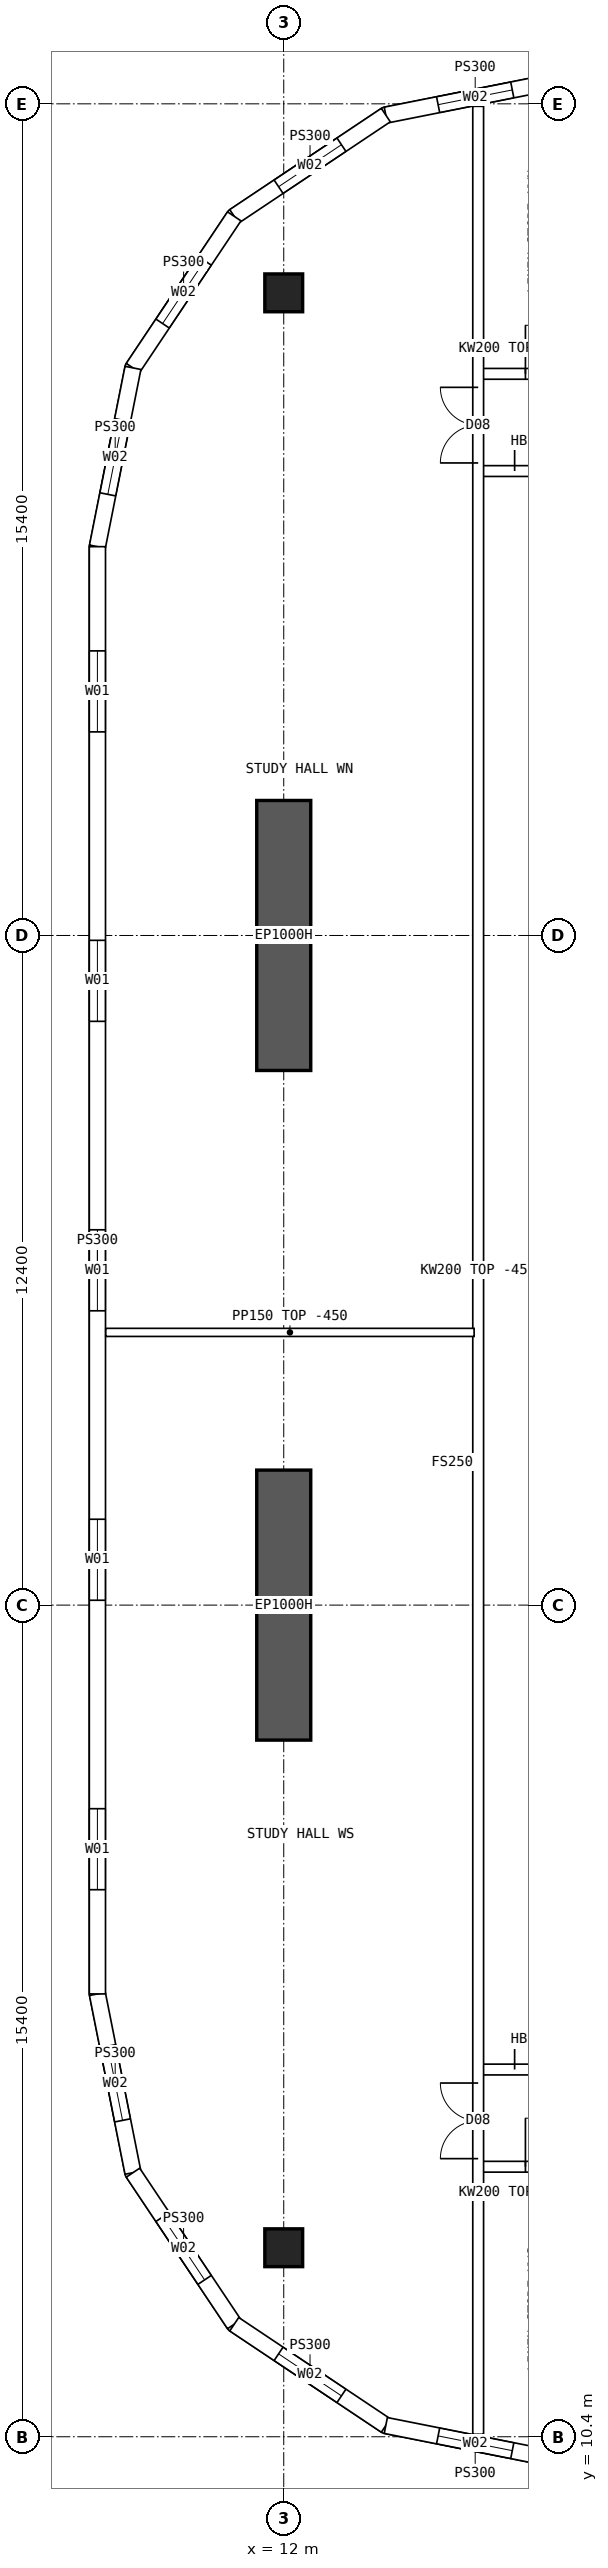
"""IFC4 building model, lengths in metres.
Left out: names, types, materials, properties, quantities, classifications, styles, units other than length and angle.
Written with IfcOpenShell. Run it as: python <this file> out.ifc"""

import sys

from ifc_helpers import new_model, si_unit, direction, frame, frame_2d, origin, origin_2d, place, context, subcontext, project, spatial, polyline, rectangle, hollow_rectangle, outline, extrude, element, fill, save


model = new_model("IFC4")
c1 = context("Model", 3, precision=1e-05, world=origin(), true_north=direction((0.0, 1.0)))
c2 = subcontext(c1, "Body", "Model", "MODEL_VIEW")
j1 = project(units=[si_unit("LENGTHUNIT", "METRE"), si_unit("PLANEANGLEUNIT", "RADIAN")], contexts=[c1])
p1 = place(None, origin())
s1 = spatial("IfcSite", under=j1, at=p1, CompositionType="ELEMENT")
p2 = place(p1, origin())
s2 = spatial("IfcBuilding", under=s1, at=p2, CompositionType="ELEMENT")
p3 = place(p2, frame((0.0, 0.0, 189.85)))
s3 = spatial("IfcBuildingStorey", under=s2, at=p3, CompositionType="ELEMENT", Elevation=189.85)
for number, where, z_axis, x_axis in (
    (1, (12.0, 13.9, 0.0), (0.0, 0.0, 1.0), (1.0, 0.0, 0.0)),
    (2, (12.0, 50.1, 0.0), (0.0, 0.0, 1.0), (1.0, 0.0, 0.0)),
):
    element("IfcColumn", number, at=place(p3, frame(where, z_axis=z_axis, x_axis=x_axis)), inside=s3, PredefinedType="COLUMN", context=c2, shape_type="SweptSolid", body=[
        extrude(hollow_rectangle(XDim=0.7, YDim=0.7, WallThickness=0.07, at=origin_2d()), origin(), (0.0, 0.0, 1.0), 3.75),
    ])
for number, where, z_axis, x_axis in (
    (3, (12.0, 23.3, 0.0), (0.0, 0.0, 1.0), (0.0, 1.0, 0.0)),
    (4, (12.0, 35.7, 0.0), (0.0, 0.0, 1.0), (0.0, 1.0, 0.0)),
):
    element("IfcWall", number, at=place(p3, frame(where, z_axis=z_axis, x_axis=x_axis)), inside=s3, PredefinedType="SHEAR", context=c2, shape_type="SweptSolid", body=[
        extrude(rectangle(XDim=5.0, YDim=1.0, at=frame_2d((2.5, 0.0))), origin(), (0.0, 0.0, 1.0), 3.75),
    ])
p4 = place(p3, frame((8.55, 45.4, 0.0), z_axis=(0.0, 0.0, 1.0), x_axis=(0.0, -1.0, 0.0)))
e5 = element("IfcWall", 5, at=p4, inside=s3, PredefinedType="SOLIDWALL", context=c2, shape_type="SweptSolid", body=[
    extrude(outline(polyline([(-0.015, -0.15), (26.815, -0.15), (26.785, 0.15), (0.015, 0.15), (-0.015, -0.15)])), origin(), (0.0, 0.0, 1.0), 3.3),
])
p5 = place(p4, frame((1.93, 0.0, 0.9)))
e6 = element("IfcOpeningElement", 6, at=p5, cuts=e5, PredefinedType="OPENING", context=c2, shape_type="SweptSolid", body=[
    extrude(rectangle(XDim=1.5, YDim=2.0, at=frame_2d((0.75, 1.0))), frame((0.0, 0.16, 0.0), z_axis=(0.0, -1.0, 0.0), x_axis=(1.0, 0.0, 0.0)), (0.0, 0.0, 1.0), 0.32),
])
p6 = place(p4, frame((7.29, 0.0, 0.9)))
e7 = element("IfcOpeningElement", 7, at=p6, cuts=e5, PredefinedType="OPENING", context=c2, shape_type="SweptSolid", body=[
    extrude(rectangle(XDim=1.5, YDim=2.0, at=frame_2d((0.75, 1.0))), frame((0.0, 0.16, 0.0), z_axis=(0.0, -1.0, 0.0), x_axis=(1.0, 0.0, 0.0)), (0.0, 0.0, 1.0), 0.32),
])
p7 = place(p4, frame((12.65, 0.0, 0.9)))
e8 = element("IfcOpeningElement", 8, at=p7, cuts=e5, PredefinedType="OPENING", context=c2, shape_type="SweptSolid", body=[
    extrude(rectangle(XDim=1.5, YDim=2.0, at=frame_2d((0.75, 1.0))), frame((0.0, 0.16, 0.0), z_axis=(0.0, -1.0, 0.0), x_axis=(1.0, 0.0, 0.0)), (0.0, 0.0, 1.0), 0.32),
])
p8 = place(p4, frame((18.01, 0.0, 0.9)))
e9 = element("IfcOpeningElement", 9, at=p8, cuts=e5, PredefinedType="OPENING", context=c2, shape_type="SweptSolid", body=[
    extrude(rectangle(XDim=1.5, YDim=2.0, at=frame_2d((0.75, 1.0))), frame((0.0, 0.16, 0.0), z_axis=(0.0, -1.0, 0.0), x_axis=(1.0, 0.0, 0.0)), (0.0, 0.0, 1.0), 0.32),
])
p9 = place(p4, frame((23.37, 0.0, 0.9)))
e10 = element("IfcOpeningElement", 10, at=p9, cuts=e5, PredefinedType="OPENING", context=c2, shape_type="SweptSolid", body=[
    extrude(rectangle(XDim=1.5, YDim=2.0, at=frame_2d((0.75, 1.0))), frame((0.0, 0.16, 0.0), z_axis=(0.0, -1.0, 0.0), x_axis=(1.0, 0.0, 0.0)), (0.0, 0.0, 1.0), 0.32),
])
p10 = place(p3, frame((17.2, 54.05, 0.0), z_axis=(0.0, 0.0, 1.0), x_axis=(-0.98078325777, -0.195100490205, 0.0)))
e11 = element("IfcWall", 11, at=p10, inside=s3, PredefinedType="SOLIDWALL", context=c2, shape_type="SweptSolid", body=[
    extrude(outline(polyline([(-0.03, -0.15), (3.405, -0.15), (3.345, 0.15), (0.03, 0.15), (-0.03, -0.15)])), origin(), (0.0, 0.0, 1.0), 3.3),
])
p11 = place(p10, frame((0.988, 0.0, 0.9)))
e12 = element("IfcOpeningElement", 12, at=p11, cuts=e11, PredefinedType="OPENING", context=c2, shape_type="SweptSolid", body=[
    extrude(rectangle(XDim=1.4, YDim=1.8, at=frame_2d((0.7, 0.9))), frame((0.0, 0.16, 0.0), z_axis=(0.0, -1.0, 0.0), x_axis=(1.0, 0.0, 0.0)), (0.0, 0.0, 1.0), 0.32),
])
p12 = place(p3, frame((13.89, 53.392, 0.0), z_axis=(0.0, 0.0, 1.0), x_axis=(-0.831493450887, -0.555534554399, 0.0)))
e13 = element("IfcWall", 13, at=p12, inside=s3, PredefinedType="SOLIDWALL", context=c2, shape_type="SweptSolid", body=[
    extrude(outline(polyline([(-0.03, -0.15), (3.405, -0.15), (3.345, 0.15), (0.03, 0.15), (-0.03, -0.15)])), origin(), (0.0, 0.0, 1.0), 3.3),
])
p13 = place(p12, frame((0.988, 0.0, 0.9)))
e14 = element("IfcOpeningElement", 14, at=p13, cuts=e13, PredefinedType="OPENING", context=c2, shape_type="SweptSolid", body=[
    extrude(rectangle(XDim=1.4, YDim=1.8, at=frame_2d((0.7, 0.9))), frame((0.0, 0.16, 0.0), z_axis=(0.0, -1.0, 0.0), x_axis=(1.0, 0.0, 0.0)), (0.0, 0.0, 1.0), 0.32),
])
p14 = place(p3, frame((11.083, 51.517, 0.0), z_axis=(0.0, 0.0, 1.0), x_axis=(-0.555534554399, -0.831493450887, 0.0)))
e15 = element("IfcWall", 15, at=p14, inside=s3, PredefinedType="SOLIDWALL", context=c2, shape_type="SweptSolid", body=[
    extrude(outline(polyline([(-0.03, -0.15), (3.405, -0.15), (3.345, 0.15), (0.03, 0.15), (-0.03, -0.15)])), origin(), (0.0, 0.0, 1.0), 3.3),
])
p15 = place(p14, frame((0.988, 0.0, 0.9)))
e16 = element("IfcOpeningElement", 16, at=p15, cuts=e15, PredefinedType="OPENING", context=c2, shape_type="SweptSolid", body=[
    extrude(rectangle(XDim=1.4, YDim=1.8, at=frame_2d((0.7, 0.9))), frame((0.0, 0.16, 0.0), z_axis=(0.0, -1.0, 0.0), x_axis=(1.0, 0.0, 0.0)), (0.0, 0.0, 1.0), 0.32),
])
p16 = place(p3, frame((9.208, 48.71, 0.0), z_axis=(0.0, 0.0, 1.0), x_axis=(-0.19508664885, -0.980786011034, 0.0)))
e17 = element("IfcWall", 17, at=p16, inside=s3, PredefinedType="SOLIDWALL", context=c2, shape_type="SweptSolid", body=[
    extrude(outline(polyline([(-0.03, -0.15), (3.39, -0.15), (3.36, 0.15), (0.03, 0.15), (-0.03, -0.15)])), origin(), (0.0, 0.0, 1.0), 3.3),
])
p17 = place(p16, frame((0.988, 0.0, 0.9)))
e18 = element("IfcOpeningElement", 18, at=p17, cuts=e17, PredefinedType="OPENING", context=c2, shape_type="SweptSolid", body=[
    extrude(rectangle(XDim=1.4, YDim=1.8, at=frame_2d((0.7, 0.9))), frame((0.0, 0.16, 0.0), z_axis=(0.0, -1.0, 0.0), x_axis=(1.0, 0.0, 0.0)), (0.0, 0.0, 1.0), 0.32),
])
p18 = place(p3, frame((8.55, 18.6, 0.0), z_axis=(0.0, 0.0, 1.0), x_axis=(0.19508664885, -0.980786011034, 0.0)))
e19 = element("IfcWall", 19, at=p18, inside=s3, PredefinedType="SOLIDWALL", context=c2, shape_type="SweptSolid", body=[
    extrude(outline(polyline([(-0.015, -0.15), (3.405, -0.15), (3.345, 0.15), (0.015, 0.15), (-0.015, -0.15)])), origin(), (0.0, 0.0, 1.0), 3.3),
])
p19 = place(p18, frame((0.988, 0.0, 0.9)))
e20 = element("IfcOpeningElement", 20, at=p19, cuts=e19, PredefinedType="OPENING", context=c2, shape_type="SweptSolid", body=[
    extrude(rectangle(XDim=1.4, YDim=1.8, at=frame_2d((0.7, 0.9))), frame((0.0, 0.16, 0.0), z_axis=(0.0, -1.0, 0.0), x_axis=(1.0, 0.0, 0.0)), (0.0, 0.0, 1.0), 0.32),
])
p20 = place(p3, frame((9.208, 15.29, 0.0), z_axis=(0.0, 0.0, 1.0), x_axis=(0.555534554399, -0.831493450887, 0.0)))
e21 = element("IfcWall", 21, at=p20, inside=s3, PredefinedType="SOLIDWALL", context=c2, shape_type="SweptSolid", body=[
    extrude(outline(polyline([(-0.03, -0.15), (3.405, -0.15), (3.345, 0.15), (0.03, 0.15), (-0.03, -0.15)])), origin(), (0.0, 0.0, 1.0), 3.3),
])
p21 = place(p20, frame((0.988, 0.0, 0.9)))
e22 = element("IfcOpeningElement", 22, at=p21, cuts=e21, PredefinedType="OPENING", context=c2, shape_type="SweptSolid", body=[
    extrude(rectangle(XDim=1.4, YDim=1.8, at=frame_2d((0.7, 0.9))), frame((0.0, 0.16, 0.0), z_axis=(0.0, -1.0, 0.0), x_axis=(1.0, 0.0, 0.0)), (0.0, 0.0, 1.0), 0.32),
])
p22 = place(p3, frame((11.083, 12.483, 0.0), z_axis=(0.0, 0.0, 1.0), x_axis=(0.831493450887, -0.555534554399, 0.0)))
e23 = element("IfcWall", 23, at=p22, inside=s3, PredefinedType="SOLIDWALL", context=c2, shape_type="SweptSolid", body=[
    extrude(outline(polyline([(-0.03, -0.15), (3.405, -0.15), (3.345, 0.15), (0.03, 0.15), (-0.03, -0.15)])), origin(), (0.0, 0.0, 1.0), 3.3),
])
p23 = place(p22, frame((0.988, 0.0, 0.9)))
e24 = element("IfcOpeningElement", 24, at=p23, cuts=e23, PredefinedType="OPENING", context=c2, shape_type="SweptSolid", body=[
    extrude(rectangle(XDim=1.4, YDim=1.8, at=frame_2d((0.7, 0.9))), frame((0.0, 0.16, 0.0), z_axis=(0.0, -1.0, 0.0), x_axis=(1.0, 0.0, 0.0)), (0.0, 0.0, 1.0), 0.32),
])
p24 = place(p3, frame((13.89, 10.608, 0.0), z_axis=(0.0, 0.0, 1.0), x_axis=(0.98078325777, -0.195100490205, 0.0)))
e25 = element("IfcWall", 25, at=p24, inside=s3, PredefinedType="SOLIDWALL", context=c2, shape_type="SweptSolid", body=[
    extrude(outline(polyline([(-0.03, -0.15), (3.405, -0.15), (3.345, 0.15), (0.03, 0.15), (-0.03, -0.15)])), origin(), (0.0, 0.0, 1.0), 3.3),
])
p25 = place(p24, frame((0.988, 0.0, 0.9)))
e26 = element("IfcOpeningElement", 26, at=p25, cuts=e25, PredefinedType="OPENING", context=c2, shape_type="SweptSolid", body=[
    extrude(rectangle(XDim=1.4, YDim=1.8, at=frame_2d((0.7, 0.9))), frame((0.0, 0.16, 0.0), z_axis=(0.0, -1.0, 0.0), x_axis=(1.0, 0.0, 0.0)), (0.0, 0.0, 1.0), 0.32),
])
p26 = place(p3, frame((15.6, 15.4, 0.0), z_axis=(0.0, 0.0, 1.0), x_axis=(1.0, 0.0, 0.0)))
e27 = element("IfcWall", 27, at=p26, inside=s3, PredefinedType="SOLIDWALL", context=c2, shape_type="SweptSolid", body=[
    extrude(rectangle(XDim=1.975, YDim=0.2, at=frame_2d((0.987, 0.0))), origin(), (0.0, 0.0, 1.0), 3.3),
])
p27 = place(p26, frame((0.875, 0.0, 0.0)))
e28 = element("IfcOpeningElement", 28, at=p27, cuts=e27, PredefinedType="OPENING", context=c2, shape_type="SweptSolid", body=[
    extrude(rectangle(XDim=0.9, YDim=2.1, at=frame_2d((0.45, 1.05))), frame((0.0, 0.11, 0.0), z_axis=(0.0, -1.0, 0.0), x_axis=(1.0, 0.0, 0.0)), (0.0, 0.0, 1.0), 0.22),
])
p28 = place(p3, frame((15.6, 17.2, 0.0), z_axis=(0.0, 0.0, 1.0), x_axis=(1.0, 0.0, 0.0)))
e29 = element("IfcWall", 29, at=p28, inside=s3, PredefinedType="SOLIDWALL", context=c2, shape_type="SweptSolid", body=[
    extrude(rectangle(XDim=1.975, YDim=0.2, at=frame_2d((0.987, 0.0))), origin(), (0.0, 0.0, 1.0), 3.3),
])
p29 = place(p28, frame((0.675, 0.0, 0.0)))
e30 = element("IfcOpeningElement", 30, at=p29, cuts=e29, PredefinedType="OPENING", context=c2, shape_type="SweptSolid", body=[
    extrude(rectangle(XDim=1.2, YDim=2.1, at=frame_2d((0.6, 1.05))), frame((0.0, 0.11, 0.0), z_axis=(0.0, -1.0, 0.0), x_axis=(1.0, 0.0, 0.0)), (0.0, 0.0, 1.0), 0.22),
])
p30 = place(p3, frame((15.6, 48.6, 0.0), z_axis=(0.0, 0.0, 1.0), x_axis=(1.0, 0.0, 0.0)))
e31 = element("IfcWall", 31, at=p30, inside=s3, PredefinedType="SOLIDWALL", context=c2, shape_type="SweptSolid", body=[
    extrude(rectangle(XDim=1.975, YDim=0.2, at=frame_2d((0.987, 0.0))), origin(), (0.0, 0.0, 1.0), 3.3),
])
p31 = place(p30, frame((0.875, 0.0, 0.0)))
e32 = element("IfcOpeningElement", 32, at=p31, cuts=e31, PredefinedType="OPENING", context=c2, shape_type="SweptSolid", body=[
    extrude(rectangle(XDim=0.9, YDim=2.1, at=frame_2d((0.45, 1.05))), frame((0.0, 0.11, 0.0), z_axis=(0.0, -1.0, 0.0), x_axis=(1.0, 0.0, 0.0)), (0.0, 0.0, 1.0), 0.22),
])
p32 = place(p3, frame((15.6, 46.8, 0.0), z_axis=(0.0, 0.0, 1.0), x_axis=(1.0, 0.0, 0.0)))
e33 = element("IfcWall", 33, at=p32, inside=s3, PredefinedType="SOLIDWALL", context=c2, shape_type="SweptSolid", body=[
    extrude(rectangle(XDim=1.975, YDim=0.2, at=frame_2d((0.987, 0.0))), origin(), (0.0, 0.0, 1.0), 3.3),
])
p33 = place(p32, frame((0.675, 0.0, 0.0)))
e34 = element("IfcOpeningElement", 34, at=p33, cuts=e33, PredefinedType="OPENING", context=c2, shape_type="SweptSolid", body=[
    extrude(rectangle(XDim=1.2, YDim=2.1, at=frame_2d((0.6, 1.05))), frame((0.0, 0.11, 0.0), z_axis=(0.0, -1.0, 0.0), x_axis=(1.0, 0.0, 0.0)), (0.0, 0.0, 1.0), 0.22),
])
p34 = place(p3, frame((8.705, 30.85, 0.0), z_axis=(0.0, 0.0, 1.0), x_axis=(1.0, 0.0, 0.0)))
e35 = element("IfcWall", 35, at=p34, inside=s3, PredefinedType="PARTITIONING", context=c2, shape_type="SweptSolid", body=[
    extrude(outline(polyline([(0.0, 0.0), (6.82, 0.0), (6.82, 3.3), (3.597, 3.3), (3.595, 2.85), (2.997, 2.85), (2.995, 3.3), (0.0, 3.3), (0.0, 0.0)])), frame((0.0, 0.075, 0.0), z_axis=(0.0, -1.0, 0.0), x_axis=(1.0, 0.0, 0.0)), (0.0, 0.0, 1.0), 0.15),
])
p35 = place(p3, frame((15.6, 10.446, 0.0), z_axis=(0.0, 0.0, 1.0), x_axis=(0.0, 1.0, 0.0)))
e36 = element("IfcWall", 36, at=p35, inside=s3, PredefinedType="SOLIDWALL", context=c2, shape_type="SweptSolid", body=[
    extrude(rectangle(XDim=43.107, YDim=0.2, at=frame_2d((21.554, 0.0))), origin(), (0.0, 0.0, 1.0), 3.3),
])
p36 = place(p35, frame((5.104, 0.0, 0.0)))
e37 = element("IfcOpeningElement", 37, at=p36, cuts=e36, PredefinedType="OPENING", context=c2, shape_type="SweptSolid", body=[
    extrude(rectangle(XDim=1.4, YDim=2.1, at=frame_2d((0.7, 1.05))), frame((0.0, 0.11, 0.0), z_axis=(0.0, -1.0, 0.0), x_axis=(1.0, 0.0, 0.0)), (0.0, 0.0, 1.0), 0.22),
])
p37 = place(p35, frame((36.504, 0.0, 0.0)))
e38 = element("IfcOpeningElement", 38, at=p37, cuts=e36, PredefinedType="OPENING", context=c2, shape_type="SweptSolid", body=[
    extrude(rectangle(XDim=1.4, YDim=2.1, at=frame_2d((0.7, 1.05))), frame((0.0, 0.11, 0.0), z_axis=(0.0, -1.0, 0.0), x_axis=(1.0, 0.0, 0.0)), (0.0, 0.0, 1.0), 0.22),
])
p38 = place(p5, origin())
e39 = element("IfcWindow", 39, at=p38, inside=s3, PartitioningType="SINGLE_PANEL", PredefinedType="WINDOW", context=c2, shape_type="SweptSolid", body=[
    extrude(rectangle(XDim=1.5, YDim=2.0, at=frame_2d((0.75, 1.0))), frame((0.0, 0.03, 0.0), z_axis=(0.0, -1.0, 0.0), x_axis=(1.0, 0.0, 0.0)), (0.0, 0.0, 1.0), 0.06),
])
fill(e6, e39)
p39 = place(p6, origin())
e40 = element("IfcWindow", 40, at=p39, inside=s3, PartitioningType="SINGLE_PANEL", PredefinedType="WINDOW", context=c2, shape_type="SweptSolid", body=[
    extrude(rectangle(XDim=1.5, YDim=2.0, at=frame_2d((0.75, 1.0))), frame((0.0, 0.03, 0.0), z_axis=(0.0, -1.0, 0.0), x_axis=(1.0, 0.0, 0.0)), (0.0, 0.0, 1.0), 0.06),
])
fill(e7, e40)
p40 = place(p7, origin())
e41 = element("IfcWindow", 41, at=p40, inside=s3, PartitioningType="SINGLE_PANEL", PredefinedType="WINDOW", context=c2, shape_type="SweptSolid", body=[
    extrude(rectangle(XDim=1.5, YDim=2.0, at=frame_2d((0.75, 1.0))), frame((0.0, 0.03, 0.0), z_axis=(0.0, -1.0, 0.0), x_axis=(1.0, 0.0, 0.0)), (0.0, 0.0, 1.0), 0.06),
])
fill(e8, e41)
p41 = place(p8, origin())
e42 = element("IfcWindow", 42, at=p41, inside=s3, PartitioningType="SINGLE_PANEL", PredefinedType="WINDOW", context=c2, shape_type="SweptSolid", body=[
    extrude(rectangle(XDim=1.5, YDim=2.0, at=frame_2d((0.75, 1.0))), frame((0.0, 0.03, 0.0), z_axis=(0.0, -1.0, 0.0), x_axis=(1.0, 0.0, 0.0)), (0.0, 0.0, 1.0), 0.06),
])
fill(e9, e42)
p42 = place(p9, origin())
e43 = element("IfcWindow", 43, at=p42, inside=s3, PartitioningType="SINGLE_PANEL", PredefinedType="WINDOW", context=c2, shape_type="SweptSolid", body=[
    extrude(rectangle(XDim=1.5, YDim=2.0, at=frame_2d((0.75, 1.0))), frame((0.0, 0.03, 0.0), z_axis=(0.0, -1.0, 0.0), x_axis=(1.0, 0.0, 0.0)), (0.0, 0.0, 1.0), 0.06),
])
fill(e10, e43)
p43 = place(p11, origin())
e44 = element("IfcWindow", 44, at=p43, inside=s3, PartitioningType="SINGLE_PANEL", PredefinedType="WINDOW", context=c2, shape_type="SweptSolid", body=[
    extrude(rectangle(XDim=1.4, YDim=1.8, at=frame_2d((0.7, 0.9))), frame((0.0, 0.03, 0.0), z_axis=(0.0, -1.0, 0.0), x_axis=(1.0, 0.0, 0.0)), (0.0, 0.0, 1.0), 0.06),
])
fill(e12, e44)
p44 = place(p13, origin())
e45 = element("IfcWindow", 45, at=p44, inside=s3, PartitioningType="SINGLE_PANEL", PredefinedType="WINDOW", context=c2, shape_type="SweptSolid", body=[
    extrude(rectangle(XDim=1.4, YDim=1.8, at=frame_2d((0.7, 0.9))), frame((0.0, 0.03, 0.0), z_axis=(0.0, -1.0, 0.0), x_axis=(1.0, 0.0, 0.0)), (0.0, 0.0, 1.0), 0.06),
])
fill(e14, e45)
p45 = place(p15, origin())
e46 = element("IfcWindow", 46, at=p45, inside=s3, PartitioningType="SINGLE_PANEL", PredefinedType="WINDOW", context=c2, shape_type="SweptSolid", body=[
    extrude(rectangle(XDim=1.4, YDim=1.8, at=frame_2d((0.7, 0.9))), frame((0.0, 0.03, 0.0), z_axis=(0.0, -1.0, 0.0), x_axis=(1.0, 0.0, 0.0)), (0.0, 0.0, 1.0), 0.06),
])
fill(e16, e46)
p46 = place(p17, origin())
e47 = element("IfcWindow", 47, at=p46, inside=s3, PartitioningType="SINGLE_PANEL", PredefinedType="WINDOW", context=c2, shape_type="SweptSolid", body=[
    extrude(rectangle(XDim=1.4, YDim=1.8, at=frame_2d((0.7, 0.9))), frame((0.0, 0.03, 0.0), z_axis=(0.0, -1.0, 0.0), x_axis=(1.0, 0.0, 0.0)), (0.0, 0.0, 1.0), 0.06),
])
fill(e18, e47)
p47 = place(p19, origin())
e48 = element("IfcWindow", 48, at=p47, inside=s3, PartitioningType="SINGLE_PANEL", PredefinedType="WINDOW", context=c2, shape_type="SweptSolid", body=[
    extrude(rectangle(XDim=1.4, YDim=1.8, at=frame_2d((0.7, 0.9))), frame((0.0, 0.03, 0.0), z_axis=(0.0, -1.0, 0.0), x_axis=(1.0, 0.0, 0.0)), (0.0, 0.0, 1.0), 0.06),
])
fill(e20, e48)
p48 = place(p21, origin())
e49 = element("IfcWindow", 49, at=p48, inside=s3, PartitioningType="SINGLE_PANEL", PredefinedType="WINDOW", context=c2, shape_type="SweptSolid", body=[
    extrude(rectangle(XDim=1.4, YDim=1.8, at=frame_2d((0.7, 0.9))), frame((0.0, 0.03, 0.0), z_axis=(0.0, -1.0, 0.0), x_axis=(1.0, 0.0, 0.0)), (0.0, 0.0, 1.0), 0.06),
])
fill(e22, e49)
p49 = place(p23, origin())
e50 = element("IfcWindow", 50, at=p49, inside=s3, PartitioningType="SINGLE_PANEL", PredefinedType="WINDOW", context=c2, shape_type="SweptSolid", body=[
    extrude(rectangle(XDim=1.4, YDim=1.8, at=frame_2d((0.7, 0.9))), frame((0.0, 0.03, 0.0), z_axis=(0.0, -1.0, 0.0), x_axis=(1.0, 0.0, 0.0)), (0.0, 0.0, 1.0), 0.06),
])
fill(e24, e50)
p50 = place(p25, origin())
e51 = element("IfcWindow", 51, at=p50, inside=s3, PartitioningType="SINGLE_PANEL", PredefinedType="WINDOW", context=c2, shape_type="SweptSolid", body=[
    extrude(rectangle(XDim=1.4, YDim=1.8, at=frame_2d((0.7, 0.9))), frame((0.0, 0.03, 0.0), z_axis=(0.0, -1.0, 0.0), x_axis=(1.0, 0.0, 0.0)), (0.0, 0.0, 1.0), 0.06),
])
fill(e26, e51)
p51 = place(p29, origin())
e52 = element("IfcDoor", 52, at=p51, inside=s3, OperationType="DOUBLE_DOOR_SINGLE_SWING", PredefinedType="DOOR", context=c2, shape_type="SweptSolid", body=[
    extrude(rectangle(XDim=1.2, YDim=2.1, at=frame_2d((0.6, 1.05))), frame((0.0, 0.025, 0.0), z_axis=(0.0, -1.0, 0.0), x_axis=(1.0, 0.0, 0.0)), (0.0, 0.0, 1.0), 0.05),
])
fill(e30, e52)
p52 = place(p33, origin())
e53 = element("IfcDoor", 53, at=p52, inside=s3, OperationType="DOUBLE_DOOR_SINGLE_SWING", PredefinedType="DOOR", context=c2, shape_type="SweptSolid", body=[
    extrude(rectangle(XDim=1.2, YDim=2.1, at=frame_2d((0.6, 1.05))), frame((0.0, 0.025, 0.0), z_axis=(0.0, -1.0, 0.0), x_axis=(1.0, 0.0, 0.0)), (0.0, 0.0, 1.0), 0.05),
])
fill(e34, e53)
p53 = place(p36, origin())
e54 = element("IfcDoor", 54, at=p53, inside=s3, OperationType="DOUBLE_DOOR_SINGLE_SWING", PredefinedType="DOOR", context=c2, shape_type="SweptSolid", body=[
    extrude(rectangle(XDim=1.4, YDim=2.1, at=frame_2d((0.7, 1.05))), frame((0.0, 0.025, 0.0), z_axis=(0.0, -1.0, 0.0), x_axis=(1.0, 0.0, 0.0)), (0.0, 0.0, 1.0), 0.05),
])
fill(e37, e54)
p54 = place(p37, origin())
e55 = element("IfcDoor", 55, at=p54, inside=s3, OperationType="DOUBLE_DOOR_SINGLE_SWING", PredefinedType="DOOR", context=c2, shape_type="SweptSolid", body=[
    extrude(rectangle(XDim=1.4, YDim=2.1, at=frame_2d((0.7, 1.05))), frame((0.0, 0.025, 0.0), z_axis=(0.0, -1.0, 0.0), x_axis=(1.0, 0.0, 0.0)), (0.0, 0.0, 1.0), 0.05),
])
fill(e38, e55)
p55 = place(p27, origin())
e56 = element("IfcDoor", 56, at=p55, inside=s3, OperationType="SINGLE_SWING_LEFT", PredefinedType="DOOR", context=c2, shape_type="SweptSolid", body=[
    extrude(rectangle(XDim=0.9, YDim=2.1, at=frame_2d((0.45, 1.05))), frame((0.0, 0.025, 0.0), z_axis=(0.0, -1.0, 0.0), x_axis=(1.0, 0.0, 0.0)), (0.0, 0.0, 1.0), 0.05),
])
fill(e28, e56)
p56 = place(p31, origin())
e57 = element("IfcDoor", 57, at=p56, inside=s3, OperationType="SINGLE_SWING_LEFT", PredefinedType="DOOR", context=c2, shape_type="SweptSolid", body=[
    extrude(rectangle(XDim=0.9, YDim=2.1, at=frame_2d((0.45, 1.05))), frame((0.0, 0.025, 0.0), z_axis=(0.0, -1.0, 0.0), x_axis=(1.0, 0.0, 0.0)), (0.0, 0.0, 1.0), 0.05),
])
fill(e32, e57)
save(model, sys.argv[1])
